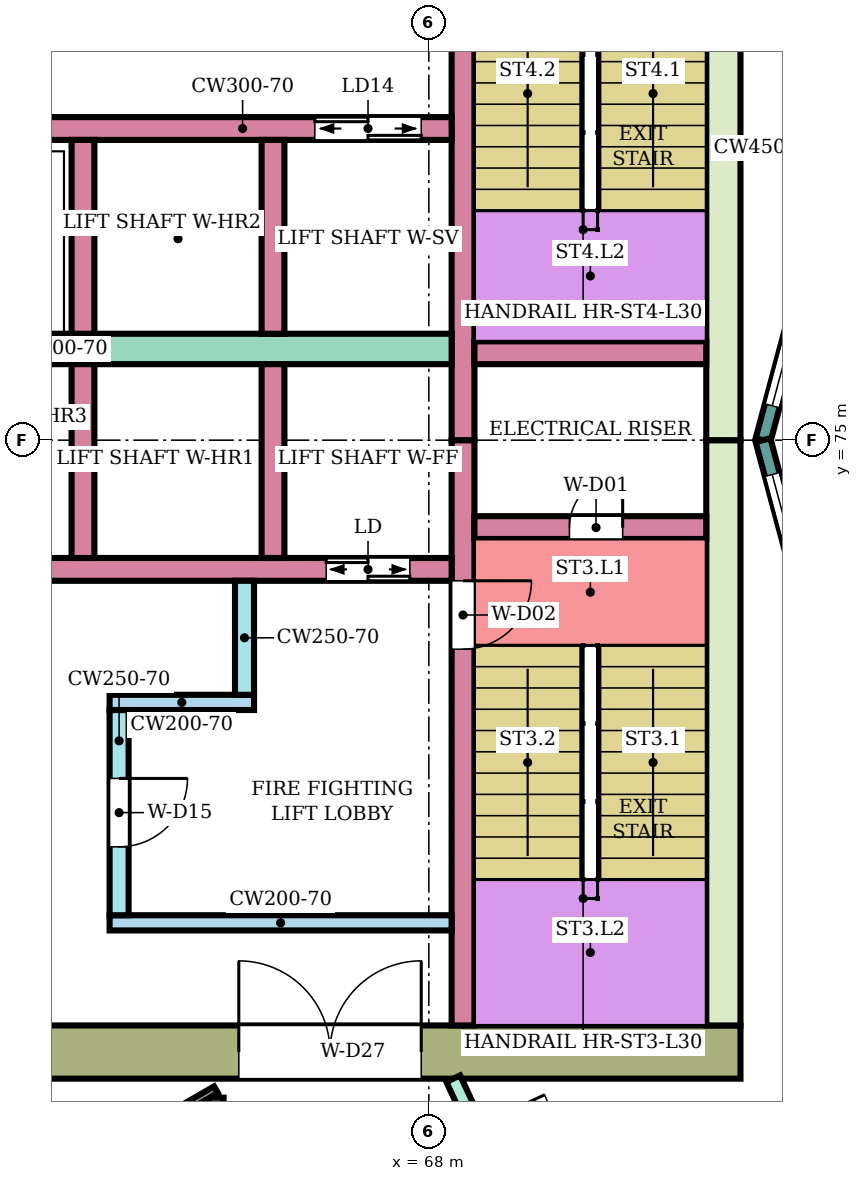
"""IFC4 building model, lengths in metres.
Left out: names, types, materials, properties, quantities, classifications, styles, units other than length and angle.
Written with IfcOpenShell. Run it as: python <this file> out.ifc"""

import sys

from ifc_helpers import new_model, si_unit, direction, frame, frame_2d, origin, place, context, subcontext, project, spatial, rectangle, extrude, element, fill, save


model = new_model("IFC4")
c1 = context("Model", 3, precision=1e-05, world=origin(), true_north=direction((0.0, 1.0)))
c2 = subcontext(c1, "Body", "Model", "MODEL_VIEW")
j1 = project(units=[si_unit("LENGTHUNIT", "METRE"), si_unit("PLANEANGLEUNIT", "RADIAN")], contexts=[c1])
p1 = place(None, origin())
s1 = spatial("IfcSite", under=j1, at=p1, CompositionType="ELEMENT")
p2 = place(p1, origin())
s2 = spatial("IfcBuilding", under=s1, at=p2, CompositionType="ELEMENT")
p3 = place(p2, frame((0.0, 0.0, 130.2)))
s3 = spatial("IfcBuildingStorey", under=s2, at=p3, CompositionType="ELEMENT", Elevation=130.2)
p4 = place(p3, frame((72.1, 66.95, 0.0), z_axis=(0.0, 0.0, 1.0), x_axis=(-1.0, 0.0, 0.0)))
e1 = element("IfcWall", 1, at=p4, inside=s3, PredefinedType="SHEAR", context=c2, shape_type="SweptSolid", body=[
    extrude(rectangle(XDim=14.8, YDim=0.7, at=frame_2d((7.4, 0.0))), origin(), (0.0, 0.0, 1.0), 3.58),
])
p5 = place(p4, frame((4.2, 0.0, 0.0)))
e2 = element("IfcOpeningElement", 2, at=p5, cuts=e1, PredefinedType="OPENING", context=c2, shape_type="SweptSolid", body=[
    extrude(rectangle(XDim=2.4, YDim=2.4, at=frame_2d((1.2, 1.2))), frame((0.0, 0.36, 0.0), z_axis=(0.0, -1.0, 0.0), x_axis=(1.0, 0.0, 0.0)), (0.0, 0.0, 1.0), 0.72),
])
for number, where, z_axis, x_axis in (
    (3, (71.875, 75.0, 0.0), (0.0, 0.0, 1.0), (0.0, -1.0, 0.0)),
    (4, (71.875, 82.7, 0.0), (0.0, 0.0, 1.0), (0.0, -1.0, 0.0)),
):
    element("IfcWall", number, at=place(p3, frame(where, z_axis=z_axis, x_axis=x_axis)), inside=s3, PredefinedType="SHEAR", context=c2, shape_type="SweptSolid", body=[
        extrude(rectangle(XDim=7.7, YDim=0.45, at=frame_2d((3.85, 0.0))), origin(), (0.0, 0.0, 1.0), 3.58),
    ])
p6 = place(p3, frame((68.45, 75.0, 0.0), z_axis=(0.0, 0.0, 1.0), x_axis=(0.0, -1.0, 0.0)))
e5 = element("IfcWall", 5, at=p6, inside=s3, PredefinedType="SHEAR", context=c2, shape_type="SweptSolid", body=[
    extrude(rectangle(XDim=7.7, YDim=0.3, at=frame_2d((3.85, 0.0))), origin(), (0.0, 0.0, 1.0), 3.58),
])
p7 = place(p6, frame((1.85, 0.0, 0.0)))
e6 = element("IfcOpeningElement", 6, at=p7, cuts=e5, PredefinedType="OPENING", context=c2, shape_type="SweptSolid", body=[
    extrude(rectangle(XDim=0.9, YDim=2.1, at=frame_2d((0.45, 1.05))), frame((0.0, 0.16, 0.0), z_axis=(0.0, -1.0, 0.0), x_axis=(1.0, 0.0, 0.0)), (0.0, 0.0, 1.0), 0.32),
])
p8 = place(p3, frame((68.45, 82.7, 0.0), z_axis=(0.0, 0.0, 1.0), x_axis=(0.0, -1.0, 0.0)))
e7 = element("IfcWall", 7, at=p8, inside=s3, PredefinedType="SHEAR", context=c2, shape_type="SweptSolid", body=[
    extrude(rectangle(XDim=7.7, YDim=0.3, at=frame_2d((3.85, 0.0))), origin(), (0.0, 0.0, 1.0), 3.58),
])
p9 = place(p8, frame((0.35, 0.0, 0.0)))
e8 = element("IfcOpeningElement", 8, at=p9, cuts=e7, PredefinedType="OPENING", context=c2, shape_type="SweptSolid", body=[
    extrude(rectangle(XDim=0.9, YDim=2.1, at=frame_2d((0.45, 1.05))), frame((0.0, 0.16, 0.0), z_axis=(0.0, -1.0, 0.0), x_axis=(1.0, 0.0, 0.0)), (0.0, 0.0, 1.0), 0.32),
])
p10 = place(p3, frame((71.65, 73.85, 0.0), z_axis=(0.0, 0.0, 1.0), x_axis=(-1.0, 0.0, 0.0)))
e9 = element("IfcWall", 9, at=p10, inside=s3, PredefinedType="SHEAR", context=c2, shape_type="SweptSolid", body=[
    extrude(rectangle(XDim=3.05, YDim=0.3, at=frame_2d((1.525, 0.0))), origin(), (0.0, 0.0, 1.0), 3.58),
])
p11 = place(p10, frame((1.1, 0.0, 0.0)))
e10 = element("IfcOpeningElement", 10, at=p11, cuts=e9, PredefinedType="OPENING", context=c2, shape_type="SweptSolid", body=[
    extrude(rectangle(XDim=0.7, YDim=2.0, at=frame_2d((0.35, 1.0))), frame((0.0, 0.16, 0.0), z_axis=(0.0, -1.0, 0.0), x_axis=(1.0, 0.0, 0.0)), (0.0, 0.0, 1.0), 0.32),
])
p12 = place(p3, frame((71.65, 76.15, 0.0), z_axis=(0.0, 0.0, 1.0), x_axis=(-1.0, 0.0, 0.0)))
e11 = element("IfcWall", 11, at=p12, inside=s3, PredefinedType="SHEAR", context=c2, shape_type="SweptSolid", body=[
    extrude(rectangle(XDim=3.05, YDim=0.3, at=frame_2d((1.525, 0.0))), origin(), (0.0, 0.0, 1.0), 3.58),
])
p13 = place(p3, frame((68.3, 73.3, 0.0), z_axis=(0.0, 0.0, 1.0), x_axis=(-1.0, 0.0, 0.0)))
e12 = element("IfcWall", 12, at=p13, inside=s3, PredefinedType="SHEAR", context=c2, shape_type="SweptSolid", body=[
    extrude(rectangle(XDim=11.0, YDim=0.3, at=frame_2d((5.5, 0.0))), origin(), (0.0, 0.0, 1.0), 3.58),
])
p14 = place(p13, frame((0.55, 0.0, 0.0)))
e13 = element("IfcOpeningElement", 13, at=p14, cuts=e12, PredefinedType="OPENING", context=c2, shape_type="SweptSolid", body=[
    extrude(rectangle(XDim=1.1, YDim=2.1, at=frame_2d((0.55, 1.05))), frame((0.0, 0.16, 0.0), z_axis=(0.0, -1.0, 0.0), x_axis=(1.0, 0.0, 0.0)), (0.0, 0.0, 1.0), 0.32),
])
p15 = place(p13, frame((8.1, 0.0, 0.0)))
e14 = element("IfcOpeningElement", 14, at=p15, cuts=e12, PredefinedType="OPENING", context=c2, shape_type="SweptSolid", body=[
    extrude(rectangle(XDim=1.0, YDim=2.1, at=frame_2d((0.5, 1.05))), frame((0.0, 0.16, 0.0), z_axis=(0.0, -1.0, 0.0), x_axis=(1.0, 0.0, 0.0)), (0.0, 0.0, 1.0), 0.32),
])
p16 = place(p3, frame((68.3, 76.2, 0.0), z_axis=(0.0, 0.0, 1.0), x_axis=(-1.0, 0.0, 0.0)))
e15 = element("IfcWall", 15, at=p16, inside=s3, PredefinedType="SHEAR", context=c2, shape_type="SweptSolid", body=[
    extrude(rectangle(XDim=11.0, YDim=0.4, at=frame_2d((5.5, 0.0))), origin(), (0.0, 0.0, 1.0), 3.58),
])
p17 = place(p3, frame((68.3, 79.1, 0.0), z_axis=(0.0, 0.0, 1.0), x_axis=(-1.0, 0.0, 0.0)))
e16 = element("IfcWall", 16, at=p17, inside=s3, PredefinedType="SHEAR", context=c2, shape_type="SweptSolid", body=[
    extrude(rectangle(XDim=11.0, YDim=0.3, at=frame_2d((5.5, 0.0))), origin(), (0.0, 0.0, 1.0), 3.58),
])
p18 = place(p17, frame((0.4, 0.0, 0.0)))
e17 = element("IfcOpeningElement", 17, at=p18, cuts=e16, PredefinedType="OPENING", context=c2, shape_type="SweptSolid", body=[
    extrude(rectangle(XDim=1.4, YDim=2.1, at=frame_2d((0.7, 1.05))), frame((0.0, 0.16, 0.0), z_axis=(0.0, -1.0, 0.0), x_axis=(1.0, 0.0, 0.0)), (0.0, 0.0, 1.0), 0.32),
])
p19 = place(p17, frame((5.4, 0.0, 0.0)))
e18 = element("IfcOpeningElement", 18, at=p19, cuts=e16, PredefinedType="OPENING", context=c2, shape_type="SweptSolid", body=[
    extrude(rectangle(XDim=1.4, YDim=2.1, at=frame_2d((0.7, 1.05))), frame((0.0, 0.16, 0.0), z_axis=(0.0, -1.0, 0.0), x_axis=(1.0, 0.0, 0.0)), (0.0, 0.0, 1.0), 0.32),
])
p20 = place(p17, frame((8.1, 0.0, 0.0)))
e19 = element("IfcOpeningElement", 19, at=p20, cuts=e16, PredefinedType="OPENING", context=c2, shape_type="SweptSolid", body=[
    extrude(rectangle(XDim=1.0, YDim=2.1, at=frame_2d((0.5, 1.05))), frame((0.0, 0.16, 0.0), z_axis=(0.0, -1.0, 0.0), x_axis=(1.0, 0.0, 0.0)), (0.0, 0.0, 1.0), 0.32),
])
for number, where, z_axis, x_axis in (
    (20, (65.95, 76.0, 0.0), (0.0, 0.0, 1.0), (0.0, -1.0, 0.0)),
    (21, (63.45, 76.0, 0.0), (0.0, 0.0, 1.0), (0.0, -1.0, 0.0)),
    (22, (65.95, 78.95, 0.0), (0.0, 0.0, 1.0), (0.0, -1.0, 0.0)),
    (23, (63.45, 78.95, 0.0), (0.0, 0.0, 1.0), (0.0, -1.0, 0.0)),
):
    element("IfcWall", number, at=place(p3, frame(where, z_axis=z_axis, x_axis=x_axis)), inside=s3, PredefinedType="SHEAR", context=c2, shape_type="SweptSolid", body=[
        extrude(rectangle(XDim=2.55, YDim=0.3, at=frame_2d((1.275, 0.0))), origin(), (0.0, 0.0, 1.0), 3.58),
    ])
p21 = place(p3, frame((68.3, 68.65, 0.0), z_axis=(0.0, 0.0, 1.0), x_axis=(-1.0, 0.0, 0.0)))
e24 = element("IfcWall", 24, at=p21, inside=s3, PredefinedType="SHEAR", context=c2, shape_type="SweptSolid", body=[
    extrude(rectangle(XDim=4.5, YDim=0.2, at=frame_2d((2.25, 0.0))), origin(), (0.0, 0.0, 1.0), 3.58),
])
p22 = place(p3, frame((63.925, 71.45, 0.0), z_axis=(0.0, 0.0, 1.0), x_axis=(0.0, -1.0, 0.0)))
e25 = element("IfcWall", 25, at=p22, inside=s3, PredefinedType="SHEAR", context=c2, shape_type="SweptSolid", body=[
    extrude(rectangle(XDim=2.7, YDim=0.25, at=frame_2d((1.35, 0.0))), origin(), (0.0, 0.0, 1.0), 3.58),
])
p23 = place(p22, frame((0.9, 0.0, 0.0)))
e26 = element("IfcOpeningElement", 26, at=p23, cuts=e25, PredefinedType="OPENING", context=c2, shape_type="SweptSolid", body=[
    extrude(rectangle(XDim=0.9, YDim=2.1, at=frame_2d((0.45, 1.05))), frame((0.0, 0.135, 0.0), z_axis=(0.0, -1.0, 0.0), x_axis=(1.0, 0.0, 0.0)), (0.0, 0.0, 1.0), 0.27),
])
p24 = place(p3, frame((65.7, 71.55, 0.0), z_axis=(0.0, 0.0, 1.0), x_axis=(-1.0, 0.0, 0.0)))
e27 = element("IfcWall", 27, at=p24, inside=s3, PredefinedType="SHEAR", context=c2, shape_type="SweptSolid", body=[
    extrude(rectangle(XDim=1.9, YDim=0.2, at=frame_2d((0.95, 0.0))), origin(), (0.0, 0.0, 1.0), 3.58),
])
p25 = place(p3, frame((65.575, 73.15, 0.0), z_axis=(0.0, 0.0, 1.0), x_axis=(0.0, -1.0, 0.0)))
e28 = element("IfcWall", 28, at=p25, inside=s3, PredefinedType="SHEAR", context=c2, shape_type="SweptSolid", body=[
    extrude(rectangle(XDim=1.5, YDim=0.25, at=frame_2d((0.75, 0.0))), origin(), (0.0, 0.0, 1.0), 3.58),
])
p26 = place(p3, frame((73.415, 78.802, 0.0), z_axis=(0.0, 0.0, 1.0), x_axis=(-0.258789828301, -0.965933654434, 0.0)))
e29 = element("IfcWall", 29, at=p26, inside=s3, PredefinedType="NOTDEFINED", context=c2, shape_type="SweptSolid", body=[
    extrude(rectangle(XDim=3.936, YDim=0.2, at=frame_2d((1.968, 0.0))), origin(), (0.0, 0.0, 1.0), 3.9),
])
p27 = place(p26, frame((0.468, 0.0, 0.9)))
e30 = element("IfcOpeningElement", 30, at=p27, cuts=e29, PredefinedType="OPENING", context=c2, shape_type="SweptSolid", body=[
    extrude(rectangle(XDim=3.0, YDim=2.3, at=frame_2d((1.5, 1.15))), frame((0.0, 0.11, 0.0), z_axis=(0.0, -1.0, 0.0), x_axis=(1.0, 0.0, 0.0)), (0.0, 0.0, 1.0), 0.22),
])
p28 = place(p3, frame((72.396, 75.0, 0.0), z_axis=(0.0, 0.0, 1.0), x_axis=(0.258789828301, -0.965933654434, 0.0)))
e31 = element("IfcWall", 31, at=p28, inside=s3, PredefinedType="NOTDEFINED", context=c2, shape_type="SweptSolid", body=[
    extrude(rectangle(XDim=3.936, YDim=0.2, at=frame_2d((1.968, 0.0))), origin(), (0.0, 0.0, 1.0), 3.9),
])
p29 = place(p28, frame((0.468, 0.0, 0.9)))
e32 = element("IfcOpeningElement", 32, at=p29, cuts=e31, PredefinedType="OPENING", context=c2, shape_type="SweptSolid", body=[
    extrude(rectangle(XDim=3.0, YDim=2.3, at=frame_2d((1.5, 1.15))), frame((0.0, 0.11, 0.0), z_axis=(0.0, -1.0, 0.0), x_axis=(1.0, 0.0, 0.0)), (0.0, 0.0, 1.0), 0.22),
])
p30 = place(p3, frame((65.2, 65.2, 0.0), z_axis=(0.0, 0.0, 1.0), x_axis=(0.0, 1.0, 0.0)))
e33 = element("IfcWall", 33, at=p30, inside=s3, PredefinedType="PARTITIONING", context=c2, shape_type="SweptSolid", body=[
    extrude(rectangle(XDim=1.15, YDim=0.2, at=frame_2d((0.575, 0.0))), origin(), (0.0, 0.0, 1.0), 3.45),
])
p31 = place(p30, frame((0.087, 0.0, 0.0)))
e34 = element("IfcOpeningElement", 34, at=p31, cuts=e33, PredefinedType="OPENING", context=c2, shape_type="SweptSolid", body=[
    extrude(rectangle(XDim=1.0, YDim=2.1, at=frame_2d((0.5, 1.05))), frame((0.0, 0.11, 0.0), z_axis=(0.0, -1.0, 0.0), x_axis=(1.0, 0.0, 0.0)), (0.0, 0.0, 1.0), 0.22),
])
p32 = place(p3, frame((68.321, 66.6, 0.0), z_axis=(0.0, 0.0, 1.0), x_axis=(0.421914092414, -0.906635813666, 0.0)))
e35 = element("IfcWall", 35, at=p32, inside=s3, PredefinedType="PARTITIONING", context=c2, shape_type="SweptSolid", body=[
    extrude(rectangle(XDim=7.459, YDim=0.2, at=frame_2d((3.73, 0.0))), origin(), (0.0, 0.0, 1.0), 3.45),
])
p33 = place(p32, frame((0.7, 0.0, 0.0)))
e36 = element("IfcOpeningElement", 36, at=p33, cuts=e35, PredefinedType="OPENING", context=c2, shape_type="SweptSolid", body=[
    extrude(rectangle(XDim=1.0, YDim=2.1, at=frame_2d((0.5, 1.05))), frame((0.0, 0.11, 0.0), z_axis=(0.0, -1.0, 0.0), x_axis=(1.0, 0.0, 0.0)), (0.0, 0.0, 1.0), 0.22),
])
p34 = place(p3, frame((71.462, 60.217, 0.0), z_axis=(0.0, 0.0, 1.0), x_axis=(0.500094460186, 0.865970860302, 0.0)))
e37 = element("IfcWall", 37, at=p34, inside=s3, PredefinedType="PARTITIONING", context=c2, shape_type="SweptSolid", body=[
    extrude(rectangle(XDim=9.373, YDim=0.2, at=frame_2d((4.687, 0.0))), origin(), (0.0, 0.0, 1.0), 3.45),
])
p35 = place(p3, frame((57.659, 62.101, 0.0), z_axis=(0.0, 0.0, 1.0), x_axis=(0.86602264145, 0.500004784474, 0.0)))
e38 = element("IfcWall", 38, at=p35, inside=s3, PredefinedType="PARTITIONING", context=c2, shape_type="SweptSolid", body=[
    extrude(rectangle(XDim=8.708, YDim=0.1, at=frame_2d((4.354, 0.0))), origin(), (0.0, 0.0, 1.0), 3.45),
])
p36 = place(p35, frame((3.929, 0.0, 0.0)))
e39 = element("IfcOpeningElement", 39, at=p36, cuts=e38, PredefinedType="OPENING", context=c2, shape_type="SweptSolid", body=[
    extrude(rectangle(XDim=0.9, YDim=2.1, at=frame_2d((0.45, 1.05))), frame((0.0, 0.06, 0.0), z_axis=(0.0, -1.0, 0.0), x_axis=(1.0, 0.0, 0.0)), (0.0, 0.0, 1.0), 0.12),
])
p37 = place(p27, origin())
e40 = element("IfcWindow", 40, at=p37, inside=s3, PartitioningType="SINGLE_PANEL", PredefinedType="WINDOW", context=c2, shape_type="SweptSolid", body=[
    extrude(rectangle(XDim=3.0, YDim=2.3, at=frame_2d((1.5, 1.15))), frame((0.0, 0.03, 0.0), z_axis=(0.0, -1.0, 0.0), x_axis=(1.0, 0.0, 0.0)), (0.0, 0.0, 1.0), 0.06),
])
fill(e30, e40)
p38 = place(p29, origin())
e41 = element("IfcWindow", 41, at=p38, inside=s3, PartitioningType="SINGLE_PANEL", PredefinedType="WINDOW", context=c2, shape_type="SweptSolid", body=[
    extrude(rectangle(XDim=3.0, YDim=2.3, at=frame_2d((1.5, 1.15))), frame((0.0, 0.03, 0.0), z_axis=(0.0, -1.0, 0.0), x_axis=(1.0, 0.0, 0.0)), (0.0, 0.0, 1.0), 0.06),
])
fill(e32, e41)
p39 = place(p11, frame((0.7, 0.0, 0.0), z_axis=(0.0, 0.0, 1.0), x_axis=(-1.0, 0.0, 0.0)))
e42 = element("IfcDoor", 42, at=p39, inside=s3, OperationType="SINGLE_SWING_RIGHT", PredefinedType="DOOR", context=c2, shape_type="SweptSolid", body=[
    extrude(rectangle(XDim=0.7, YDim=2.0, at=frame_2d((0.35, 1.0))), frame((0.0, 0.025, 0.0), z_axis=(0.0, -1.0, 0.0), x_axis=(1.0, 0.0, 0.0)), (0.0, 0.0, 1.0), 0.05),
])
fill(e10, e42)
p40 = place(p7, origin())
e43 = element("IfcDoor", 43, at=p40, inside=s3, OperationType="SINGLE_SWING_LEFT", PredefinedType="DOOR", context=c2, shape_type="SweptSolid", body=[
    extrude(rectangle(XDim=0.9, YDim=2.1, at=frame_2d((0.45, 1.05))), frame((0.0, 0.025, 0.0), z_axis=(0.0, -1.0, 0.0), x_axis=(1.0, 0.0, 0.0)), (0.0, 0.0, 1.0), 0.05),
])
fill(e6, e43)
p41 = place(p14, origin())
e44 = element("IfcDoor", 44, at=p41, inside=s3, OperationType="DOUBLE_DOOR_SLIDING", PredefinedType="DOOR", context=c2, shape_type="SweptSolid", body=[
    extrude(rectangle(XDim=1.1, YDim=2.1, at=frame_2d((0.55, 1.05))), frame((0.0, 0.025, 0.0), z_axis=(0.0, -1.0, 0.0), x_axis=(1.0, 0.0, 0.0)), (0.0, 0.0, 1.0), 0.05),
])
fill(e13, e44)
p42 = place(p18, origin())
e45 = element("IfcDoor", 45, at=p42, inside=s3, OperationType="DOUBLE_DOOR_SLIDING", PredefinedType="DOOR", context=c2, shape_type="SweptSolid", body=[
    extrude(rectangle(XDim=1.4, YDim=2.1, at=frame_2d((0.7, 1.05))), frame((0.0, 0.025, 0.0), z_axis=(0.0, -1.0, 0.0), x_axis=(1.0, 0.0, 0.0)), (0.0, 0.0, 1.0), 0.05),
])
fill(e17, e45)
p43 = place(p23, origin())
e46 = element("IfcDoor", 46, at=p43, inside=s3, OperationType="SINGLE_SWING_LEFT", PredefinedType="DOOR", context=c2, shape_type="SweptSolid", body=[
    extrude(rectangle(XDim=0.9, YDim=2.1, at=frame_2d((0.45, 1.05))), frame((0.0, 0.025, 0.0), z_axis=(0.0, -1.0, 0.0), x_axis=(1.0, 0.0, 0.0)), (0.0, 0.0, 1.0), 0.05),
])
fill(e26, e46)
p44 = place(p5, frame((2.4, 0.0, 0.0), z_axis=(0.0, 0.0, 1.0), x_axis=(-1.0, 0.0, 0.0)))
e47 = element("IfcDoor", 47, at=p44, inside=s3, OperationType="DOUBLE_DOOR_SINGLE_SWING", PredefinedType="DOOR", context=c2, shape_type="SweptSolid", body=[
    extrude(rectangle(XDim=2.4, YDim=2.4, at=frame_2d((1.2, 1.2))), frame((0.0, 0.025, 0.0), z_axis=(0.0, -1.0, 0.0), x_axis=(1.0, 0.0, 0.0)), (0.0, 0.0, 1.0), 0.05),
])
fill(e2, e47)
save(model, sys.argv[1])
